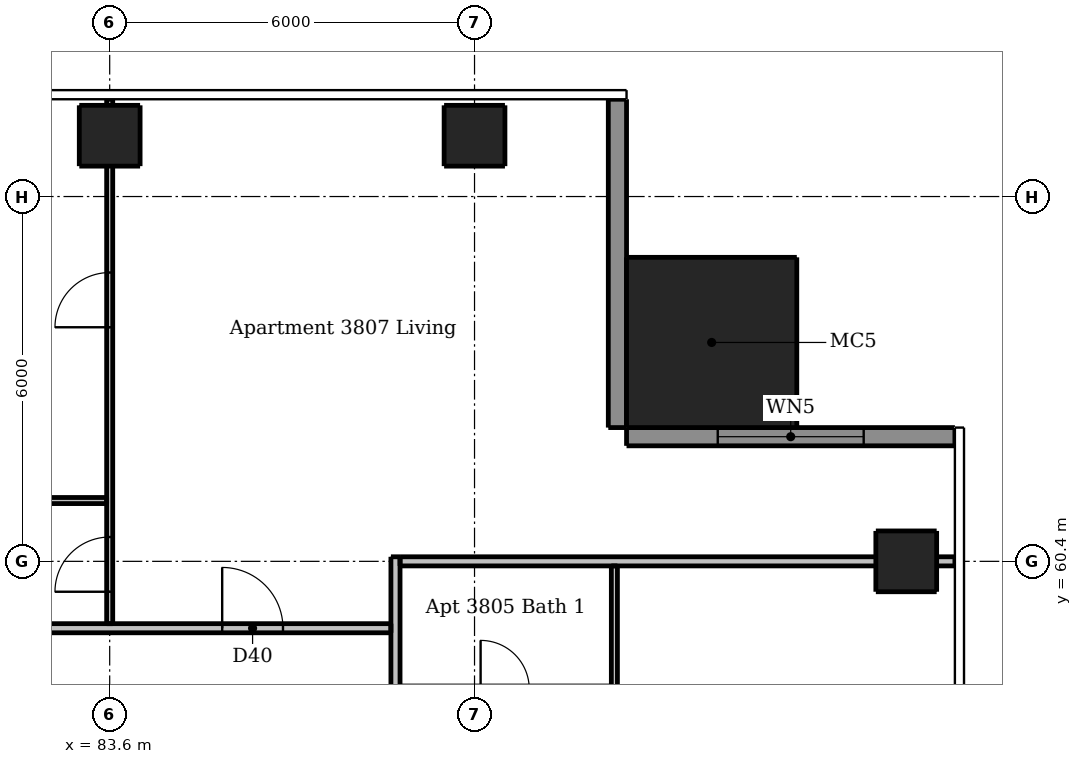
"""IFC4 building model, lengths in metres.
Left out: names, types, materials, properties, quantities, classifications, styles, units other than length and angle.
Written with IfcOpenShell. Run it as: python <this file> out.ifc"""

import sys

from ifc_helpers import new_model, si_unit, direction, frame, frame_2d, origin, origin_2d, place, context, subcontext, project, spatial, rectangle, extrude, element, fill, save


model = new_model("IFC4")
c1 = context("Model", 3, precision=1e-05, world=origin(), true_north=direction((0.0, 1.0)))
c2 = subcontext(c1, "Body", "Model", "MODEL_VIEW")
j1 = project(units=[si_unit("LENGTHUNIT", "METRE"), si_unit("PLANEANGLEUNIT", "RADIAN")], contexts=[c1])
p1 = place(None, origin())
s1 = spatial("IfcSite", under=j1, at=p1, CompositionType="ELEMENT")
p2 = place(p1, origin())
s2 = spatial("IfcBuilding", under=s1, at=p2, CompositionType="ELEMENT")
p3 = place(p2, frame((0.0, 0.0, 143.8)))
s3 = spatial("IfcBuildingStorey", under=s2, at=p3, CompositionType="ELEMENT", Elevation=143.8)
for number, where, z_axis, x_axis in (
    (1, (96.7, 60.4, 0.0), (0.0, 0.0, 1.0), (1.0, 0.0, 0.0)),
    (2, (83.6, 67.4, 0.0), (0.0, 0.0, 1.0), (1.0, 0.0, 0.0)),
    (3, (89.6, 67.4, 0.0), (0.0, 0.0, 1.0), (1.0, 0.0, 0.0)),
):
    element("IfcColumn", number, at=place(p3, frame(where, z_axis=z_axis, x_axis=x_axis)), inside=s3, PredefinedType="COLUMN", context=c2, shape_type="SweptSolid", body=[
        extrude(rectangle(XDim=1.0, YDim=1.0, at=origin_2d()), origin(), (0.0, 0.0, 1.0), 3.05),
    ])
p4 = place(p3, frame((93.5, 64.0, 0.0), z_axis=(0.0, 0.0, 1.0), x_axis=(1.0, 0.0, 0.0)))
e4 = element("IfcColumn", 4, at=p4, inside=s3, PredefinedType="COLUMN", context=c2, shape_type="SweptSolid", body=[
    extrude(rectangle(XDim=2.8, YDim=2.8, at=origin_2d()), origin(), (0.0, 0.0, 1.0), 3.3),
])
p5 = place(p3, frame((97.5, 62.45, 0.0), z_axis=(0.0, 0.0, 1.0), x_axis=(-1.0, 0.0, 0.0)))
e5 = element("IfcWall", 5, at=p5, inside=s3, PredefinedType="SOLIDWALL", context=c2, shape_type="SweptSolid", body=[
    extrude(rectangle(XDim=5.4, YDim=0.3, at=frame_2d((2.7, 0.0))), origin(), (0.0, 0.0, 1.0), 3.05),
])
p6 = place(p5, frame((1.5, 0.0, 0.15)))
e6 = element("IfcOpeningElement", 6, at=p6, cuts=e5, PredefinedType="OPENING", context=c2, shape_type="SweptSolid", body=[
    extrude(rectangle(XDim=2.4, YDim=2.1, at=frame_2d((1.2, 1.05))), frame((0.0, 0.16, 0.0), z_axis=(0.0, -1.0, 0.0), x_axis=(1.0, 0.0, 0.0)), (0.0, 0.0, 1.0), 0.32),
])
p7 = place(p3, frame((91.95, 62.6, 0.0), z_axis=(0.0, 0.0, 1.0), x_axis=(0.0, 1.0, 0.0)))
e7 = element("IfcWall", 7, at=p7, inside=s3, PredefinedType="SOLIDWALL", context=c2, shape_type="SweptSolid", body=[
    extrude(rectangle(XDim=5.4, YDim=0.3, at=frame_2d((2.7, 0.0))), origin(), (0.0, 0.0, 1.0), 3.05),
])
p8 = place(p3, frame((83.6, 59.375, 0.0), z_axis=(0.0, 0.0, 1.0), x_axis=(0.0, 1.0, 0.0)))
e8 = element("IfcWall", 8, at=p8, inside=s3, PredefinedType="PARTITIONING", context=c2, shape_type="SweptSolid", body=[
    extrude(rectangle(XDim=8.625, YDim=0.1, at=frame_2d((4.312, 0.0))), origin(), (0.0, 0.0, 1.0), 2.516),
])
p9 = place(p8, frame((0.525, 0.0, 0.0)))
e9 = element("IfcOpeningElement", 9, at=p9, cuts=e8, PredefinedType="OPENING", context=c2, shape_type="SweptSolid", body=[
    extrude(rectangle(XDim=0.9, YDim=2.1, at=frame_2d((0.45, 1.05))), frame((0.0, 0.06, 0.0), z_axis=(0.0, -1.0, 0.0), x_axis=(1.0, 0.0, 0.0)), (0.0, 0.0, 1.0), 0.12),
])
p10 = place(p8, frame((4.875, 0.0, 0.0)))
e10 = element("IfcOpeningElement", 10, at=p10, cuts=e8, PredefinedType="OPENING", context=c2, shape_type="SweptSolid", body=[
    extrude(rectangle(XDim=0.9, YDim=2.1, at=frame_2d((0.45, 1.05))), frame((0.0, 0.06, 0.0), z_axis=(0.0, -1.0, 0.0), x_axis=(1.0, 0.0, 0.0)), (0.0, 0.0, 1.0), 0.12),
])
p11 = place(p3, frame((91.9, 58.25, 0.0), z_axis=(0.0, 0.0, 1.0), x_axis=(0.0, 1.0, 0.0)))
e11 = element("IfcWall", 11, at=p11, inside=s3, PredefinedType="PARTITIONING", context=c2, shape_type="SweptSolid", body=[
    extrude(rectangle(XDim=2.075, YDim=0.1, at=frame_2d((1.038, 0.0))), origin(), (0.0, 0.0, 1.0), 3.05),
])
p12 = place(p3, frame((83.55, 61.4, 0.0), z_axis=(0.0, 0.0, 1.0), x_axis=(-1.0, 0.0, 0.0)))
e12 = element("IfcWall", 12, at=p12, inside=s3, PredefinedType="PARTITIONING", context=c2, shape_type="SweptSolid", body=[
    extrude(rectangle(XDim=5.875, YDim=0.1, at=frame_2d((2.938, 0.0))), origin(), (0.0, 0.0, 1.0), 3.05),
])
p13 = place(p12, frame((3.75, 0.0, 0.0)))
e13 = element("IfcOpeningElement", 13, at=p13, cuts=e12, PredefinedType="OPENING", context=c2, shape_type="SweptSolid", body=[
    extrude(rectangle(XDim=0.8, YDim=2.1, at=frame_2d((0.4, 1.05))), frame((0.0, 0.06, 0.0), z_axis=(0.0, -1.0, 0.0), x_axis=(1.0, 0.0, 0.0)), (0.0, 0.0, 1.0), 0.12),
])
p14 = place(p3, frame((88.3, 60.475, 0.0), z_axis=(0.0, 0.0, 1.0), x_axis=(0.0, -1.0, 0.0)))
e14 = element("IfcWall", 14, at=p14, inside=s3, PredefinedType="PARTITIONING", context=c2, shape_type="SweptSolid", body=[
    extrude(rectangle(XDim=28.7, YDim=0.15, at=frame_2d((14.35, 0.0))), origin(), (0.0, 0.0, 1.0), 3.05),
])
p15 = place(p14, frame((27.425, 0.0, 0.0)))
e15 = element("IfcOpeningElement", 15, at=p15, cuts=e14, PredefinedType="OPENING", context=c2, shape_type="SweptSolid", body=[
    extrude(rectangle(XDim=1.0, YDim=2.1, at=frame_2d((0.5, 1.05))), frame((0.0, 0.085, 0.0), z_axis=(0.0, -1.0, 0.0), x_axis=(1.0, 0.0, 0.0)), (0.0, 0.0, 1.0), 0.17),
])
p16 = place(p14, frame((13.075, 0.0, 0.0)))
e16 = element("IfcOpeningElement", 16, at=p16, cuts=e14, PredefinedType="OPENING", context=c2, shape_type="SweptSolid", body=[
    extrude(rectangle(XDim=1.0, YDim=2.1, at=frame_2d((0.5, 1.05))), frame((0.0, 0.085, 0.0), z_axis=(0.0, -1.0, 0.0), x_axis=(1.0, 0.0, 0.0)), (0.0, 0.0, 1.0), 0.17),
])
p17 = place(p14, frame((2.575, 0.0, 0.0)))
e17 = element("IfcOpeningElement", 17, at=p17, cuts=e14, PredefinedType="OPENING", context=c2, shape_type="SweptSolid", body=[
    extrude(rectangle(XDim=1.0, YDim=2.1, at=frame_2d((0.5, 1.05))), frame((0.0, 0.085, 0.0), z_axis=(0.0, -1.0, 0.0), x_axis=(1.0, 0.0, 0.0)), (0.0, 0.0, 1.0), 0.17),
])
p18 = place(p3, frame((88.375, 60.4, 0.0), z_axis=(0.0, 0.0, 1.0), x_axis=(1.0, 0.0, 0.0)))
e18 = element("IfcWall", 18, at=p18, inside=s3, PredefinedType="PARTITIONING", context=c2, shape_type="SweptSolid", body=[
    extrude(rectangle(XDim=9.125, YDim=0.15, at=frame_2d((4.562, 0.0))), origin(), (0.0, 0.0, 1.0), 2.647),
])
p19 = place(p3, frame((59.675, 59.3, 0.0), z_axis=(0.0, 0.0, 1.0), x_axis=(1.0, 0.0, 0.0)))
e19 = element("IfcWall", 19, at=p19, inside=s3, PredefinedType="PARTITIONING", context=c2, shape_type="SweptSolid", body=[
    extrude(rectangle(XDim=28.55, YDim=0.15, at=frame_2d((14.275, 0.0))), origin(), (0.0, 0.0, 1.0), 3.05),
])
p20 = place(p19, frame((8.975, 0.0, 0.0)))
e20 = element("IfcOpeningElement", 20, at=p20, cuts=e19, PredefinedType="OPENING", context=c2, shape_type="SweptSolid", body=[
    extrude(rectangle(XDim=1.0, YDim=2.1, at=frame_2d((0.5, 1.05))), frame((0.0, 0.085, 0.0), z_axis=(0.0, -1.0, 0.0), x_axis=(1.0, 0.0, 0.0)), (0.0, 0.0, 1.0), 0.17),
])
p21 = place(p19, frame((25.775, 0.0, 0.0)))
e21 = element("IfcOpeningElement", 21, at=p21, cuts=e19, PredefinedType="OPENING", context=c2, shape_type="SweptSolid", body=[
    extrude(rectangle(XDim=1.0, YDim=2.1, at=frame_2d((0.5, 1.05))), frame((0.0, 0.085, 0.0), z_axis=(0.0, -1.0, 0.0), x_axis=(1.0, 0.0, 0.0)), (0.0, 0.0, 1.0), 0.17),
])
p22 = place(p6, origin())
e22 = element("IfcWindow", 22, at=p22, inside=s3, PartitioningType="DOUBLE_PANEL_VERTICAL", PredefinedType="WINDOW", context=c2, shape_type="SweptSolid", body=[
    extrude(rectangle(XDim=2.4, YDim=2.1, at=frame_2d((1.2, 1.05))), frame((0.0, 0.03, 0.0), z_axis=(0.0, -1.0, 0.0), x_axis=(1.0, 0.0, 0.0)), (0.0, 0.0, 1.0), 0.06),
])
fill(e6, e22)
p23 = place(p21, origin())
e23 = element("IfcDoor", 23, at=p23, inside=s3, OperationType="SINGLE_SWING_LEFT", PredefinedType="DOOR", context=c2, shape_type="SweptSolid", body=[
    extrude(rectangle(XDim=1.0, YDim=2.1, at=frame_2d((0.5, 1.05))), frame((0.0, 0.025, 0.0), z_axis=(0.0, -1.0, 0.0), x_axis=(1.0, 0.0, 0.0)), (0.0, 0.0, 1.0), 0.05),
])
fill(e21, e23)
p24 = place(p9, origin())
e24 = element("IfcDoor", 24, at=p24, inside=s3, OperationType="SINGLE_SWING_LEFT", PredefinedType="DOOR", context=c2, shape_type="SweptSolid", body=[
    extrude(rectangle(XDim=0.9, YDim=2.1, at=frame_2d((0.45, 1.05))), frame((0.0, 0.025, 0.0), z_axis=(0.0, -1.0, 0.0), x_axis=(1.0, 0.0, 0.0)), (0.0, 0.0, 1.0), 0.05),
])
fill(e9, e24)
p25 = place(p10, origin())
e25 = element("IfcDoor", 25, at=p25, inside=s3, OperationType="SINGLE_SWING_LEFT", PredefinedType="DOOR", context=c2, shape_type="SweptSolid", body=[
    extrude(rectangle(XDim=0.9, YDim=2.1, at=frame_2d((0.45, 1.05))), frame((0.0, 0.025, 0.0), z_axis=(0.0, -1.0, 0.0), x_axis=(1.0, 0.0, 0.0)), (0.0, 0.0, 1.0), 0.05),
])
fill(e10, e25)
save(model, sys.argv[1])
